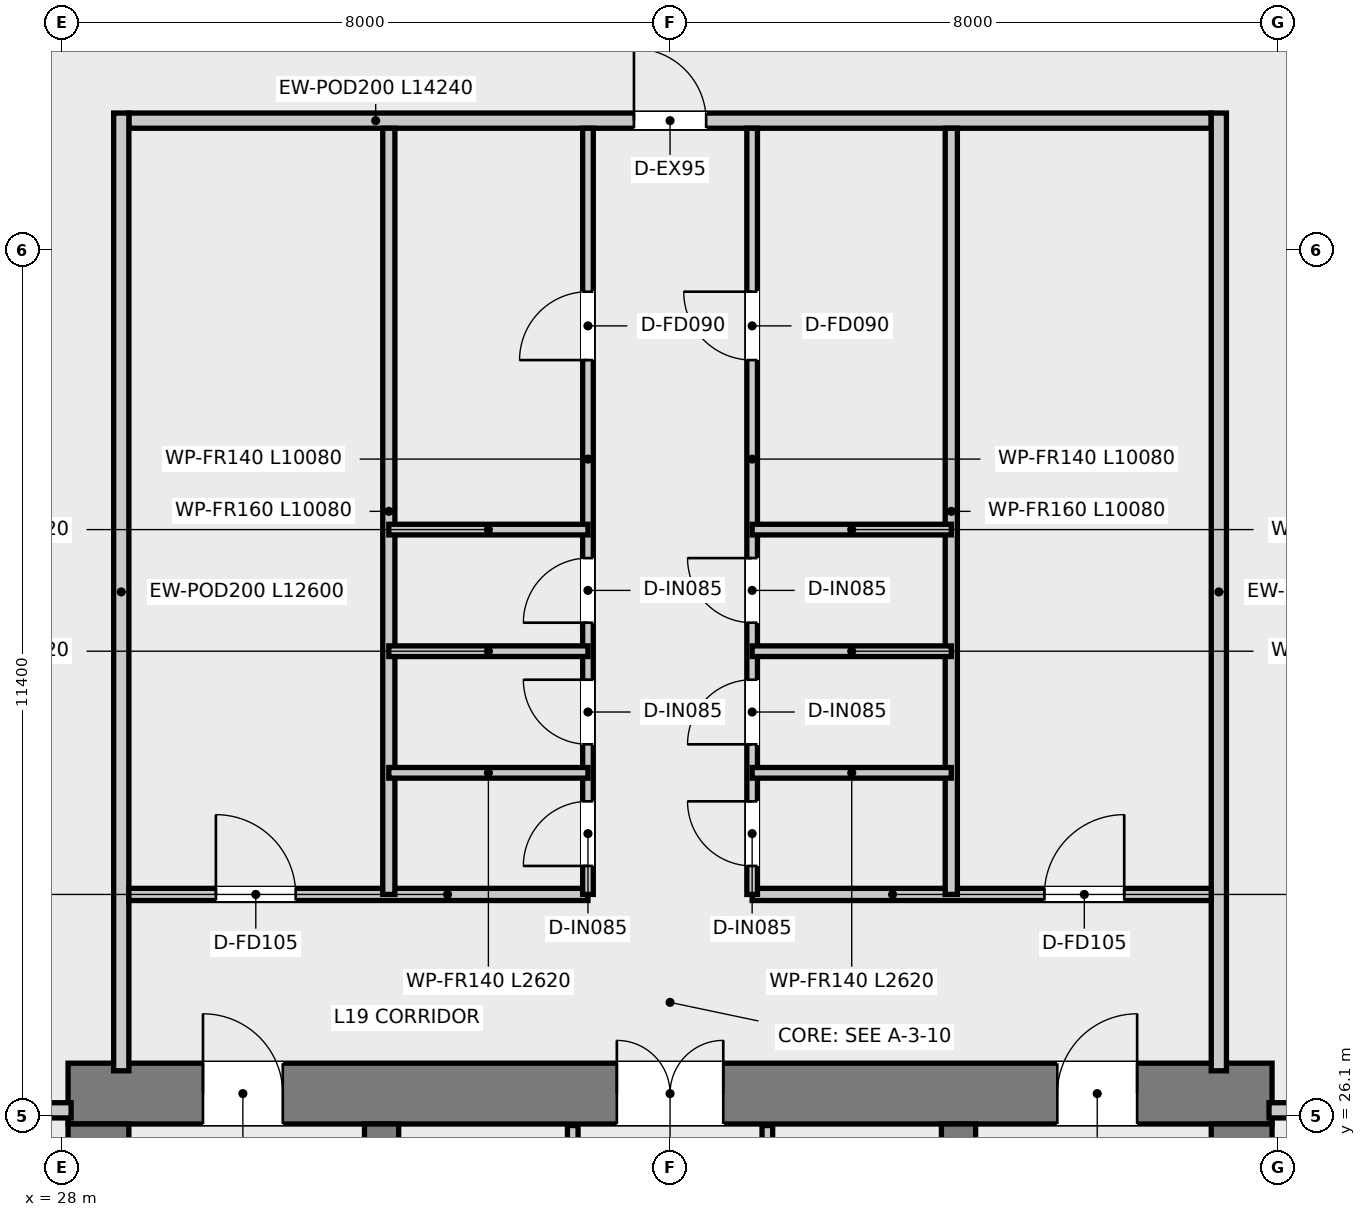
"""IFC4 building model, lengths in metres.
Left out: names, types, materials, properties, quantities, classifications, styles, units other than length and angle.
Written with IfcOpenShell. Run it as: python <this file> out.ifc"""

import sys

from ifc_helpers import new_model, si_unit, direction, frame, frame_2d, origin, place, context, subcontext, project, spatial, rectangle, extrude, element, fill, save


model = new_model("IFC4")
c1 = context("Model", 3, precision=1e-05, world=origin(), true_north=direction((0.0, 1.0)))
c2 = subcontext(c1, "Body", "Model", "MODEL_VIEW")
j1 = project(units=[si_unit("LENGTHUNIT", "METRE"), si_unit("PLANEANGLEUNIT", "RADIAN")], contexts=[c1])
p1 = place(None, origin())
s1 = spatial("IfcSite", under=j1, at=p1, CompositionType="ELEMENT")
p2 = place(p1, origin())
s2 = spatial("IfcBuilding", under=s1, at=p2, CompositionType="ELEMENT")
p3 = place(p2, frame((0.0, 0.0, 80.3)))
s3 = spatial("IfcBuildingStorey", under=s2, at=p3, CompositionType="ELEMENT", Elevation=80.3)
p4 = place(p3, frame((28.08, 26.4, 0.0), z_axis=(0.0, 0.0, 1.0), x_axis=(1.0, 0.0, 0.0)))
e1 = element("IfcWall", 1, at=p4, inside=s3, PredefinedType="SHEAR", context=c2, shape_type="SweptSolid", body=[
    extrude(rectangle(XDim=15.84, YDim=0.8, at=frame_2d((7.92, 0.0))), origin(), (0.0, 0.0, 1.0), 5.8),
])
p5 = place(p4, frame((7.22, 0.0, 0.0)))
e2 = element("IfcOpeningElement", 2, at=p5, cuts=e1, PredefinedType="OPENING", context=c2, shape_type="SweptSolid", body=[
    extrude(rectangle(XDim=1.4, YDim=2.2, at=frame_2d((0.7, 1.1))), frame((0.0, 0.41, 0.0), z_axis=(0.0, -1.0, 0.0), x_axis=(1.0, 0.0, 0.0)), (0.0, 0.0, 1.0), 0.82),
])
p6 = place(p4, frame((1.775, 0.0, 0.0)))
e3 = element("IfcOpeningElement", 3, at=p6, cuts=e1, PredefinedType="OPENING", context=c2, shape_type="SweptSolid", body=[
    extrude(rectangle(XDim=1.05, YDim=2.1, at=frame_2d((0.525, 1.05))), frame((0.0, 0.41, 0.0), z_axis=(0.0, -1.0, 0.0), x_axis=(1.0, 0.0, 0.0)), (0.0, 0.0, 1.0), 0.82),
])
p7 = place(p4, frame((13.015, 0.0, 0.0)))
e4 = element("IfcOpeningElement", 4, at=p7, cuts=e1, PredefinedType="OPENING", context=c2, shape_type="SweptSolid", body=[
    extrude(rectangle(XDim=1.05, YDim=2.1, at=frame_2d((0.525, 1.05))), frame((0.0, 0.41, 0.0), z_axis=(0.0, -1.0, 0.0), x_axis=(1.0, 0.0, 0.0)), (0.0, 0.0, 1.0), 0.82),
])
p8 = place(p3, frame((28.48, 11.3, 0.0), z_axis=(0.0, 0.0, 1.0), x_axis=(0.0, 1.0, 0.0)))
e5 = element("IfcWall", 5, at=p8, inside=s3, PredefinedType="SHEAR", context=c2, shape_type="SweptSolid", body=[
    extrude(rectangle(XDim=14.7, YDim=0.8, at=frame_2d((7.35, 0.0))), origin(), (0.0, 0.0, 1.0), 5.8),
])
p9 = place(p8, frame((11.675, 0.0, 0.0)))
e6 = element("IfcOpeningElement", 6, at=p9, cuts=e5, PredefinedType="OPENING", context=c2, shape_type="SweptSolid", body=[
    extrude(rectangle(XDim=1.05, YDim=2.1, at=frame_2d((0.525, 1.05))), frame((0.0, 0.41, 0.0), z_axis=(0.0, -1.0, 0.0), x_axis=(1.0, 0.0, 0.0)), (0.0, 0.0, 1.0), 0.82),
])
p10 = place(p3, frame((43.52, 11.3, 0.0), z_axis=(0.0, 0.0, 1.0), x_axis=(0.0, 1.0, 0.0)))
e7 = element("IfcWall", 7, at=p10, inside=s3, PredefinedType="SHEAR", context=c2, shape_type="SweptSolid", body=[
    extrude(rectangle(XDim=14.7, YDim=0.8, at=frame_2d((7.35, 0.0))), origin(), (0.0, 0.0, 1.0), 5.8),
])
p11 = place(p10, frame((11.675, 0.0, 0.0)))
e8 = element("IfcOpeningElement", 8, at=p11, cuts=e7, PredefinedType="OPENING", context=c2, shape_type="SweptSolid", body=[
    extrude(rectangle(XDim=1.05, YDim=2.1, at=frame_2d((0.525, 1.05))), frame((0.0, 0.41, 0.0), z_axis=(0.0, -1.0, 0.0), x_axis=(1.0, 0.0, 0.0)), (0.0, 0.0, 1.0), 0.82),
])
p12 = place(p3, frame((32.205, 13.22, 0.0), z_axis=(0.0, 0.0, 1.0), x_axis=(0.0, 1.0, 0.0)))
e9 = element("IfcWall", 9, at=p12, inside=s3, PredefinedType="SHEAR", context=c2, shape_type="SweptSolid", body=[
    extrude(rectangle(XDim=12.78, YDim=0.45, at=frame_2d((6.39, 0.0))), origin(), (0.0, 0.0, 1.0), 5.8),
])
p13 = place(p12, frame((10.58, 0.0, 0.0)))
e10 = element("IfcOpeningElement", 10, at=p13, cuts=e9, PredefinedType="OPENING", context=c2, shape_type="SweptSolid", body=[
    extrude(rectangle(XDim=1.1, YDim=2.15, at=frame_2d((0.55, 1.075))), frame((0.0, 0.235, 0.0), z_axis=(0.0, -1.0, 0.0), x_axis=(1.0, 0.0, 0.0)), (0.0, 0.0, 1.0), 0.47),
])
p14 = place(p3, frame((39.795, 13.22, 0.0), z_axis=(0.0, 0.0, 1.0), x_axis=(0.0, 1.0, 0.0)))
e11 = element("IfcWall", 11, at=p14, inside=s3, PredefinedType="SHEAR", context=c2, shape_type="SweptSolid", body=[
    extrude(rectangle(XDim=12.78, YDim=0.45, at=frame_2d((6.39, 0.0))), origin(), (0.0, 0.0, 1.0), 5.8),
])
p15 = place(p14, frame((10.58, 0.0, 0.0)))
e12 = element("IfcOpeningElement", 12, at=p15, cuts=e11, PredefinedType="OPENING", context=c2, shape_type="SweptSolid", body=[
    extrude(rectangle(XDim=1.1, YDim=2.15, at=frame_2d((0.55, 1.075))), frame((0.0, 0.235, 0.0), z_axis=(0.0, -1.0, 0.0), x_axis=(1.0, 0.0, 0.0)), (0.0, 0.0, 1.0), 0.47),
])
p16 = place(p3, frame((34.72, 20.2, 0.0), z_axis=(0.0, 0.0, 1.0), x_axis=(0.0, 1.0, 0.0)))
e13 = element("IfcWall", 13, at=p16, inside=s3, PredefinedType="PARTITIONING", context=c2, shape_type="SweptSolid", body=[
    extrude(rectangle(XDim=5.78, YDim=0.14, at=frame_2d((2.89, 0.0))), origin(), (0.0, 0.0, 1.0), 4.32),
])
p17 = place(p16, frame((1.05, 0.0, 0.0)))
e14 = element("IfcOpeningElement", 14, at=p17, cuts=e13, PredefinedType="OPENING", context=c2, shape_type="SweptSolid", body=[
    extrude(rectangle(XDim=0.9, YDim=2.1, at=frame_2d((0.45, 1.05))), frame((0.0, 0.08, 0.0), z_axis=(0.0, -1.0, 0.0), x_axis=(1.0, 0.0, 0.0)), (0.0, 0.0, 1.0), 0.16),
])
p18 = place(p3, frame((37.28, 20.2, 0.0), z_axis=(0.0, 0.0, 1.0), x_axis=(0.0, 1.0, 0.0)))
e15 = element("IfcWall", 15, at=p18, inside=s3, PredefinedType="PARTITIONING", context=c2, shape_type="SweptSolid", body=[
    extrude(rectangle(XDim=5.78, YDim=0.14, at=frame_2d((2.89, 0.0))), origin(), (0.0, 0.0, 1.0), 4.32),
])
p19 = place(p18, frame((0.95, 0.0, 0.0)))
e16 = element("IfcOpeningElement", 16, at=p19, cuts=e15, PredefinedType="OPENING", context=c2, shape_type="SweptSolid", body=[
    extrude(rectangle(XDim=1.1, YDim=2.15, at=frame_2d((0.55, 1.075))), frame((0.0, 0.08, 0.0), z_axis=(0.0, -1.0, 0.0), x_axis=(1.0, 0.0, 0.0)), (0.0, 0.0, 1.0), 0.16),
])
p20 = place(p3, frame((28.88, 39.2, 0.0), z_axis=(0.0, 0.0, 1.0), x_axis=(1.0, 0.0, 0.0)))
e17 = element("IfcWall", 17, at=p20, inside=s3, PredefinedType="SOLIDWALL", context=c2, shape_type="SweptSolid", body=[
    extrude(rectangle(XDim=14.24, YDim=0.2, at=frame_2d((7.12, 0.0))), origin(), (0.0, 0.0, 1.0), 4.93),
])
p21 = place(p20, frame((6.645, 0.0, 0.0)))
e18 = element("IfcOpeningElement", 18, at=p21, cuts=e17, PredefinedType="OPENING", context=c2, shape_type="SweptSolid", body=[
    extrude(rectangle(XDim=0.95, YDim=2.1, at=frame_2d((0.475, 1.05))), frame((0.0, 0.11, 0.0), z_axis=(0.0, -1.0, 0.0), x_axis=(1.0, 0.0, 0.0)), (0.0, 0.0, 1.0), 0.22),
])
for number, where, z_axis, x_axis in (
    (19, (28.78, 26.7, 0.0), (0.0, 0.0, 1.0), (0.0, 1.0, 0.0)),
    (20, (43.22, 26.7, 0.0), (0.0, 0.0, 1.0), (0.0, 1.0, 0.0)),
):
    element("IfcWall", number, at=place(p3, frame(where, z_axis=z_axis, x_axis=x_axis)), inside=s3, PredefinedType="SOLIDWALL", context=c2, shape_type="SweptSolid", body=[
        extrude(rectangle(XDim=12.6, YDim=0.2, at=frame_2d((6.3, 0.0))), origin(), (0.0, 0.0, 1.0), 4.82),
    ])
for number, where, z_axis, x_axis in (
    (21, (24.58, 26.18, 0.0), (0.0, 0.0, 1.0), (1.0, 0.0, 0.0)),
    (22, (43.88, 26.18, 0.0), (0.0, 0.0, 1.0), (1.0, 0.0, 0.0)),
):
    element("IfcWall", number, at=place(p3, frame(where, z_axis=z_axis, x_axis=x_axis)), inside=s3, PredefinedType="SOLIDWALL", context=c2, shape_type="SweptSolid", body=[
        extrude(rectangle(XDim=3.54, YDim=0.2, at=frame_2d((1.77, 0.0))), origin(), (0.0, 0.0, 1.0), 4.82),
    ])
p22 = place(p3, frame((28.88, 29.02, 0.0), z_axis=(0.0, 0.0, 1.0), x_axis=(1.0, 0.0, 0.0)))
e23 = element("IfcWall", 23, at=p22, inside=s3, PredefinedType="PARTITIONING", context=c2, shape_type="SweptSolid", body=[
    extrude(rectangle(XDim=6.04, YDim=0.16, at=frame_2d((3.02, 0.0))), origin(), (0.0, 0.0, 1.0), 4.93),
])
p23 = place(p22, frame((1.145, 0.0, 0.0)))
e24 = element("IfcOpeningElement", 24, at=p23, cuts=e23, PredefinedType="OPENING", context=c2, shape_type="SweptSolid", body=[
    extrude(rectangle(XDim=1.05, YDim=2.1, at=frame_2d((0.525, 1.05))), frame((0.0, 0.09, 0.0), z_axis=(0.0, -1.0, 0.0), x_axis=(1.0, 0.0, 0.0)), (0.0, 0.0, 1.0), 0.18),
])
p24 = place(p3, frame((37.08, 29.02, 0.0), z_axis=(0.0, 0.0, 1.0), x_axis=(1.0, 0.0, 0.0)))
e25 = element("IfcWall", 25, at=p24, inside=s3, PredefinedType="PARTITIONING", context=c2, shape_type="SweptSolid", body=[
    extrude(rectangle(XDim=6.04, YDim=0.16, at=frame_2d((3.02, 0.0))), origin(), (0.0, 0.0, 1.0), 4.93),
])
p25 = place(p24, frame((3.845, 0.0, 0.0)))
e26 = element("IfcOpeningElement", 26, at=p25, cuts=e25, PredefinedType="OPENING", context=c2, shape_type="SweptSolid", body=[
    extrude(rectangle(XDim=1.05, YDim=2.1, at=frame_2d((0.525, 1.05))), frame((0.0, 0.09, 0.0), z_axis=(0.0, -1.0, 0.0), x_axis=(1.0, 0.0, 0.0)), (0.0, 0.0, 1.0), 0.18),
])
for number, where, z_axis, x_axis in (
    (27, (32.3, 29.02, 0.0), (0.0, 0.0, 1.0), (0.0, 1.0, 0.0)),
    (28, (39.7, 29.02, 0.0), (0.0, 0.0, 1.0), (0.0, 1.0, 0.0)),
):
    element("IfcWall", number, at=place(p3, frame(where, z_axis=z_axis, x_axis=x_axis)), inside=s3, PredefinedType="PARTITIONING", context=c2, shape_type="SweptSolid", body=[
        extrude(rectangle(XDim=10.08, YDim=0.16, at=frame_2d((5.04, 0.0))), origin(), (0.0, 0.0, 1.0), 4.82),
    ])
p26 = place(p3, frame((34.92, 29.02, 0.0), z_axis=(0.0, 0.0, 1.0), x_axis=(0.0, 1.0, 0.0)))
e29 = element("IfcWall", 29, at=p26, inside=s3, PredefinedType="PARTITIONING", context=c2, shape_type="SweptSolid", body=[
    extrude(rectangle(XDim=10.08, YDim=0.14, at=frame_2d((5.04, 0.0))), origin(), (0.0, 0.0, 1.0), 4.82),
])
p27 = place(p26, frame((7.03, 0.0, 0.0)))
e30 = element("IfcOpeningElement", 30, at=p27, cuts=e29, PredefinedType="OPENING", context=c2, shape_type="SweptSolid", body=[
    extrude(rectangle(XDim=0.9, YDim=2.1, at=frame_2d((0.45, 1.05))), frame((0.0, 0.08, 0.0), z_axis=(0.0, -1.0, 0.0), x_axis=(1.0, 0.0, 0.0)), (0.0, 0.0, 1.0), 0.16),
])
p28 = place(p26, frame((0.375, 0.0, 0.0)))
e31 = element("IfcOpeningElement", 31, at=p28, cuts=e29, PredefinedType="OPENING", context=c2, shape_type="SweptSolid", body=[
    extrude(rectangle(XDim=0.85, YDim=2.1, at=frame_2d((0.425, 1.05))), frame((0.0, 0.08, 0.0), z_axis=(0.0, -1.0, 0.0), x_axis=(1.0, 0.0, 0.0)), (0.0, 0.0, 1.0), 0.16),
])
p29 = place(p26, frame((1.975, 0.0, 0.0)))
e32 = element("IfcOpeningElement", 32, at=p29, cuts=e29, PredefinedType="OPENING", context=c2, shape_type="SweptSolid", body=[
    extrude(rectangle(XDim=0.85, YDim=2.1, at=frame_2d((0.425, 1.05))), frame((0.0, 0.08, 0.0), z_axis=(0.0, -1.0, 0.0), x_axis=(1.0, 0.0, 0.0)), (0.0, 0.0, 1.0), 0.16),
])
p30 = place(p26, frame((3.575, 0.0, 0.0)))
e33 = element("IfcOpeningElement", 33, at=p30, cuts=e29, PredefinedType="OPENING", context=c2, shape_type="SweptSolid", body=[
    extrude(rectangle(XDim=0.85, YDim=2.1, at=frame_2d((0.425, 1.05))), frame((0.0, 0.08, 0.0), z_axis=(0.0, -1.0, 0.0), x_axis=(1.0, 0.0, 0.0)), (0.0, 0.0, 1.0), 0.16),
])
p31 = place(p3, frame((37.08, 29.02, 0.0), z_axis=(0.0, 0.0, 1.0), x_axis=(0.0, 1.0, 0.0)))
e34 = element("IfcWall", 34, at=p31, inside=s3, PredefinedType="PARTITIONING", context=c2, shape_type="SweptSolid", body=[
    extrude(rectangle(XDim=10.08, YDim=0.14, at=frame_2d((5.04, 0.0))), origin(), (0.0, 0.0, 1.0), 4.82),
])
p32 = place(p31, frame((7.03, 0.0, 0.0)))
e35 = element("IfcOpeningElement", 35, at=p32, cuts=e34, PredefinedType="OPENING", context=c2, shape_type="SweptSolid", body=[
    extrude(rectangle(XDim=0.9, YDim=2.1, at=frame_2d((0.45, 1.05))), frame((0.0, 0.08, 0.0), z_axis=(0.0, -1.0, 0.0), x_axis=(1.0, 0.0, 0.0)), (0.0, 0.0, 1.0), 0.16),
])
p33 = place(p31, frame((0.375, 0.0, 0.0)))
e36 = element("IfcOpeningElement", 36, at=p33, cuts=e34, PredefinedType="OPENING", context=c2, shape_type="SweptSolid", body=[
    extrude(rectangle(XDim=0.85, YDim=2.1, at=frame_2d((0.425, 1.05))), frame((0.0, 0.08, 0.0), z_axis=(0.0, -1.0, 0.0), x_axis=(1.0, 0.0, 0.0)), (0.0, 0.0, 1.0), 0.16),
])
p34 = place(p31, frame((1.975, 0.0, 0.0)))
e37 = element("IfcOpeningElement", 37, at=p34, cuts=e34, PredefinedType="OPENING", context=c2, shape_type="SweptSolid", body=[
    extrude(rectangle(XDim=0.85, YDim=2.1, at=frame_2d((0.425, 1.05))), frame((0.0, 0.08, 0.0), z_axis=(0.0, -1.0, 0.0), x_axis=(1.0, 0.0, 0.0)), (0.0, 0.0, 1.0), 0.16),
])
p35 = place(p31, frame((3.575, 0.0, 0.0)))
e38 = element("IfcOpeningElement", 38, at=p35, cuts=e34, PredefinedType="OPENING", context=c2, shape_type="SweptSolid", body=[
    extrude(rectangle(XDim=0.85, YDim=2.1, at=frame_2d((0.425, 1.05))), frame((0.0, 0.08, 0.0), z_axis=(0.0, -1.0, 0.0), x_axis=(1.0, 0.0, 0.0)), (0.0, 0.0, 1.0), 0.16),
])
for number, where, z_axis, x_axis in (
    (39, (32.3, 33.82, 0.0), (0.0, 0.0, 1.0), (1.0, 0.0, 0.0)),
    (40, (37.08, 33.82, 0.0), (0.0, 0.0, 1.0), (1.0, 0.0, 0.0)),
):
    element("IfcWall", number, at=place(p3, frame(where, z_axis=z_axis, x_axis=x_axis)), inside=s3, PredefinedType="PARTITIONING", context=c2, shape_type="SweptSolid", body=[
        extrude(rectangle(XDim=2.62, YDim=0.14, at=frame_2d((1.31, 0.0))), origin(), (0.0, 0.0, 1.0), 4.97),
    ])
for number, where, z_axis, x_axis in (
    (41, (32.3, 30.62, 0.0), (0.0, 0.0, 1.0), (1.0, 0.0, 0.0)),
    (42, (32.3, 32.22, 0.0), (0.0, 0.0, 1.0), (1.0, 0.0, 0.0)),
    (43, (37.08, 30.62, 0.0), (0.0, 0.0, 1.0), (1.0, 0.0, 0.0)),
    (44, (37.08, 32.22, 0.0), (0.0, 0.0, 1.0), (1.0, 0.0, 0.0)),
):
    element("IfcWall", number, at=place(p3, frame(where, z_axis=z_axis, x_axis=x_axis)), inside=s3, PredefinedType="PARTITIONING", context=c2, shape_type="SweptSolid", body=[
        extrude(rectangle(XDim=2.62, YDim=0.14, at=frame_2d((1.31, 0.0))), origin(), (0.0, 0.0, 1.0), 5.52),
    ])
p36 = place(p5, origin())
e45 = element("IfcDoor", 45, at=p36, inside=s3, OperationType="DOUBLE_DOOR_SINGLE_SWING", PredefinedType="DOOR", context=c2, shape_type="SweptSolid", body=[
    extrude(rectangle(XDim=1.4, YDim=2.2, at=frame_2d((0.7, 1.1))), frame((0.0, 0.025, 0.0), z_axis=(0.0, -1.0, 0.0), x_axis=(1.0, 0.0, 0.0)), (0.0, 0.0, 1.0), 0.05),
])
fill(e2, e45)
p37 = place(p6, origin())
e46 = element("IfcDoor", 46, at=p37, inside=s3, OperationType="SINGLE_SWING_LEFT", PredefinedType="DOOR", context=c2, shape_type="SweptSolid", body=[
    extrude(rectangle(XDim=1.05, YDim=2.1, at=frame_2d((0.525, 1.05))), frame((0.0, 0.025, 0.0), z_axis=(0.0, -1.0, 0.0), x_axis=(1.0, 0.0, 0.0)), (0.0, 0.0, 1.0), 0.05),
])
fill(e3, e46)
p38 = place(p7, origin())
e47 = element("IfcDoor", 47, at=p38, inside=s3, OperationType="SINGLE_SWING_RIGHT", PredefinedType="DOOR", context=c2, shape_type="SweptSolid", body=[
    extrude(rectangle(XDim=1.05, YDim=2.1, at=frame_2d((0.525, 1.05))), frame((0.0, 0.025, 0.0), z_axis=(0.0, -1.0, 0.0), x_axis=(1.0, 0.0, 0.0)), (0.0, 0.0, 1.0), 0.05),
])
fill(e4, e47)
p39 = place(p23, origin())
e48 = element("IfcDoor", 48, at=p39, inside=s3, OperationType="SINGLE_SWING_LEFT", PredefinedType="DOOR", context=c2, shape_type="SweptSolid", body=[
    extrude(rectangle(XDim=1.05, YDim=2.1, at=frame_2d((0.525, 1.05))), frame((0.0, 0.025, 0.0), z_axis=(0.0, -1.0, 0.0), x_axis=(1.0, 0.0, 0.0)), (0.0, 0.0, 1.0), 0.05),
])
fill(e24, e48)
p40 = place(p25, origin())
e49 = element("IfcDoor", 49, at=p40, inside=s3, OperationType="SINGLE_SWING_RIGHT", PredefinedType="DOOR", context=c2, shape_type="SweptSolid", body=[
    extrude(rectangle(XDim=1.05, YDim=2.1, at=frame_2d((0.525, 1.05))), frame((0.0, 0.025, 0.0), z_axis=(0.0, -1.0, 0.0), x_axis=(1.0, 0.0, 0.0)), (0.0, 0.0, 1.0), 0.05),
])
fill(e26, e49)
p41 = place(p27, origin())
e50 = element("IfcDoor", 50, at=p41, inside=s3, OperationType="SINGLE_SWING_LEFT", PredefinedType="DOOR", context=c2, shape_type="SweptSolid", body=[
    extrude(rectangle(XDim=0.9, YDim=2.1, at=frame_2d((0.45, 1.05))), frame((0.0, 0.025, 0.0), z_axis=(0.0, -1.0, 0.0), x_axis=(1.0, 0.0, 0.0)), (0.0, 0.0, 1.0), 0.05),
])
fill(e30, e50)
p42 = place(p32, origin())
e51 = element("IfcDoor", 51, at=p42, inside=s3, OperationType="SINGLE_SWING_RIGHT", PredefinedType="DOOR", context=c2, shape_type="SweptSolid", body=[
    extrude(rectangle(XDim=0.9, YDim=2.1, at=frame_2d((0.45, 1.05))), frame((0.0, 0.025, 0.0), z_axis=(0.0, -1.0, 0.0), x_axis=(1.0, 0.0, 0.0)), (0.0, 0.0, 1.0), 0.05),
])
fill(e35, e51)
p43 = place(p28, origin())
e52 = element("IfcDoor", 52, at=p43, inside=s3, OperationType="SINGLE_SWING_LEFT", PredefinedType="DOOR", context=c2, shape_type="SweptSolid", body=[
    extrude(rectangle(XDim=0.85, YDim=2.1, at=frame_2d((0.425, 1.05))), frame((0.0, 0.025, 0.0), z_axis=(0.0, -1.0, 0.0), x_axis=(1.0, 0.0, 0.0)), (0.0, 0.0, 1.0), 0.05),
])
fill(e31, e52)
p44 = place(p29, origin())
e53 = element("IfcDoor", 53, at=p44, inside=s3, OperationType="SINGLE_SWING_RIGHT", PredefinedType="DOOR", context=c2, shape_type="SweptSolid", body=[
    extrude(rectangle(XDim=0.85, YDim=2.1, at=frame_2d((0.425, 1.05))), frame((0.0, 0.025, 0.0), z_axis=(0.0, -1.0, 0.0), x_axis=(1.0, 0.0, 0.0)), (0.0, 0.0, 1.0), 0.05),
])
fill(e32, e53)
p45 = place(p30, origin())
e54 = element("IfcDoor", 54, at=p45, inside=s3, OperationType="SINGLE_SWING_LEFT", PredefinedType="DOOR", context=c2, shape_type="SweptSolid", body=[
    extrude(rectangle(XDim=0.85, YDim=2.1, at=frame_2d((0.425, 1.05))), frame((0.0, 0.025, 0.0), z_axis=(0.0, -1.0, 0.0), x_axis=(1.0, 0.0, 0.0)), (0.0, 0.0, 1.0), 0.05),
])
fill(e33, e54)
p46 = place(p33, origin())
e55 = element("IfcDoor", 55, at=p46, inside=s3, OperationType="SINGLE_SWING_RIGHT", PredefinedType="DOOR", context=c2, shape_type="SweptSolid", body=[
    extrude(rectangle(XDim=0.85, YDim=2.1, at=frame_2d((0.425, 1.05))), frame((0.0, 0.025, 0.0), z_axis=(0.0, -1.0, 0.0), x_axis=(1.0, 0.0, 0.0)), (0.0, 0.0, 1.0), 0.05),
])
fill(e36, e55)
p47 = place(p34, origin())
e56 = element("IfcDoor", 56, at=p47, inside=s3, OperationType="SINGLE_SWING_LEFT", PredefinedType="DOOR", context=c2, shape_type="SweptSolid", body=[
    extrude(rectangle(XDim=0.85, YDim=2.1, at=frame_2d((0.425, 1.05))), frame((0.0, 0.025, 0.0), z_axis=(0.0, -1.0, 0.0), x_axis=(1.0, 0.0, 0.0)), (0.0, 0.0, 1.0), 0.05),
])
fill(e37, e56)
p48 = place(p35, origin())
e57 = element("IfcDoor", 57, at=p48, inside=s3, OperationType="SINGLE_SWING_RIGHT", PredefinedType="DOOR", context=c2, shape_type="SweptSolid", body=[
    extrude(rectangle(XDim=0.85, YDim=2.1, at=frame_2d((0.425, 1.05))), frame((0.0, 0.025, 0.0), z_axis=(0.0, -1.0, 0.0), x_axis=(1.0, 0.0, 0.0)), (0.0, 0.0, 1.0), 0.05),
])
fill(e38, e57)
p49 = place(p21, origin())
e58 = element("IfcDoor", 58, at=p49, inside=s3, OperationType="SINGLE_SWING_LEFT", PredefinedType="DOOR", context=c2, shape_type="SweptSolid", body=[
    extrude(rectangle(XDim=0.95, YDim=2.1, at=frame_2d((0.475, 1.05))), frame((0.0, 0.025, 0.0), z_axis=(0.0, -1.0, 0.0), x_axis=(1.0, 0.0, 0.0)), (0.0, 0.0, 1.0), 0.05),
])
fill(e18, e58)
save(model, sys.argv[1])
